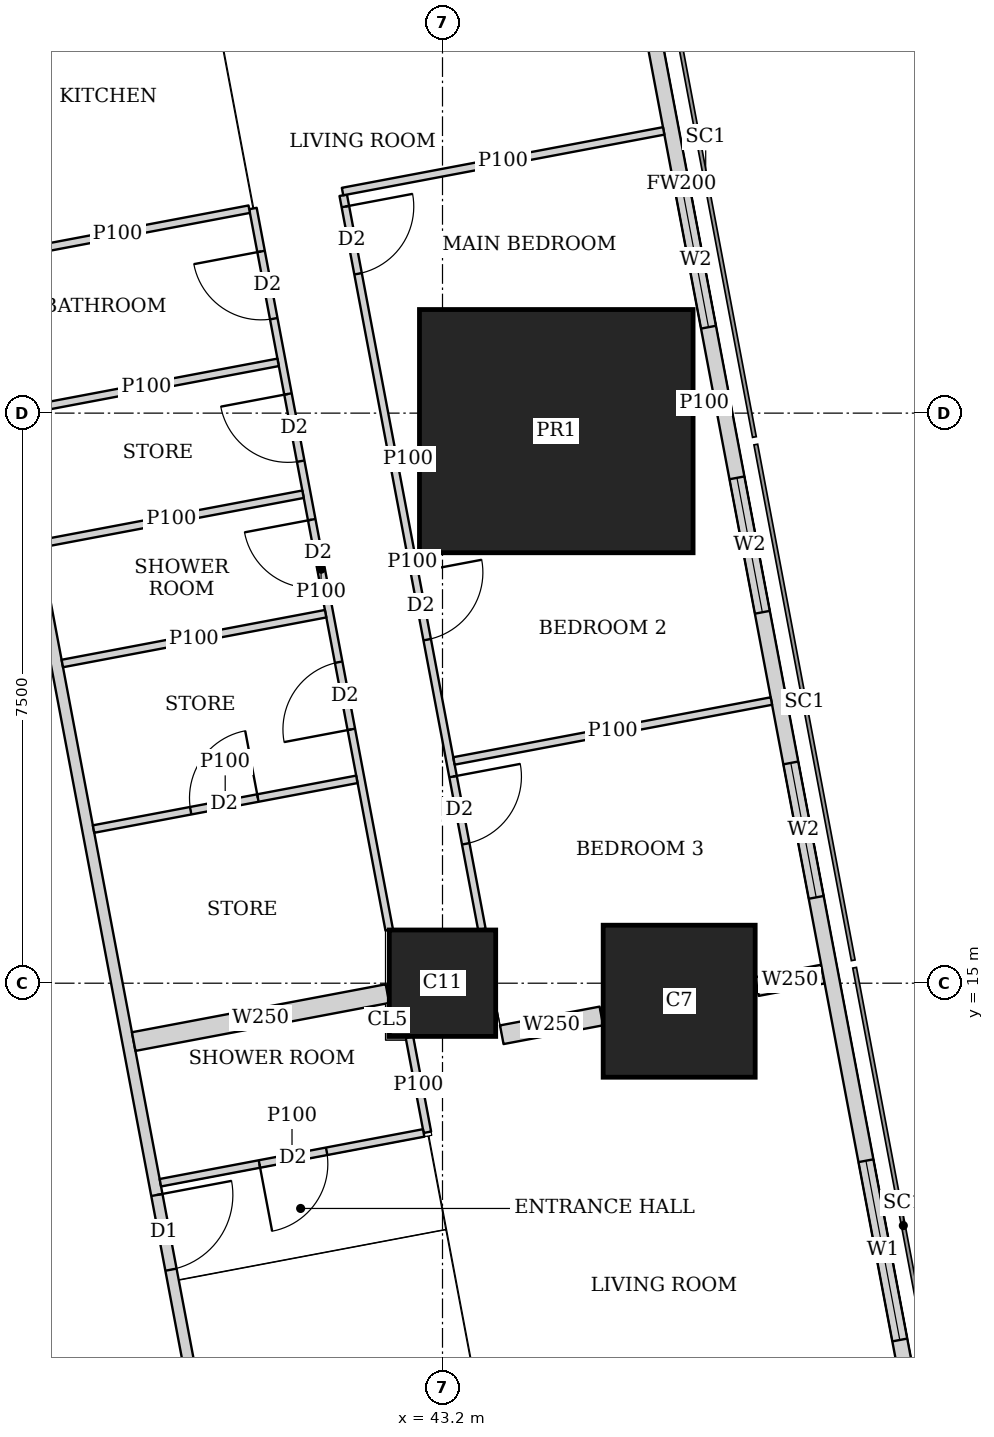
"""IFC4 building model, lengths in metres.
Left out: names, types, materials, properties, quantities, classifications, styles, units other than length and angle.
Written with IfcOpenShell. Run it as: python <this file> out.ifc"""

import sys

from ifc_helpers import new_model, si_unit, direction, frame, frame_2d, origin, origin_2d, place, context, subcontext, project, spatial, rectangle, extrude, element, fill, save


model = new_model("IFC4")
c1 = context("Model", 3, precision=1e-05, world=origin(), true_north=direction((0.0, 1.0)))
c2 = subcontext(c1, "Body", "Model", "MODEL_VIEW")
j1 = project(units=[si_unit("LENGTHUNIT", "METRE"), si_unit("PLANEANGLEUNIT", "RADIAN")], contexts=[c1])
p1 = place(None, origin())
s1 = spatial("IfcSite", under=j1, at=p1, CompositionType="ELEMENT")
p2 = place(p1, origin())
s2 = spatial("IfcBuilding", under=s1, at=p2, CompositionType="ELEMENT")
p3 = place(p2, frame((0.0, 0.0, 274.1)))
s3 = spatial("IfcBuildingStorey", under=s2, at=p3, CompositionType="ELEMENT", Elevation=274.1)
p4 = place(p3, frame((43.2, 15.0, 0.0), z_axis=(0.0, 0.0, 1.0), x_axis=(1.0, 0.0, 0.0)))
e1 = element("IfcColumn", 1, at=p4, inside=s3, PredefinedType="COLUMN", context=c2, shape_type="SweptSolid", body=[
    extrude(rectangle(XDim=1.4, YDim=1.4, at=origin_2d()), origin(), (0.0, 0.0, 1.0), 3.75),
])
p5 = place(p3, frame((46.314, 14.763, 0.0), z_axis=(0.0, 0.0, 1.0), x_axis=(1.0, 0.0, 0.0)))
e2 = element("IfcColumn", 2, at=p5, inside=s3, PredefinedType="COLUMN", context=c2, shape_type="SweptSolid", body=[
    extrude(rectangle(XDim=2.0, YDim=2.0, at=origin_2d()), origin(), (0.0, 0.0, 1.0), 3.75),
])
p6 = place(p3, frame((44.697, 22.263, 0.0), z_axis=(0.0, 0.0, 1.0), x_axis=(1.0, 0.0, 0.0)))
e3 = element("IfcColumn", 3, at=p6, inside=s3, PredefinedType="COLUMN", context=c2, shape_type="SweptSolid", body=[
    extrude(rectangle(XDim=3.6, YDim=3.2, at=origin_2d()), origin(), (0.0, 0.0, 1.0), 3.75),
])
p7 = place(p3, frame((49.684, 7.832, 0.0), z_axis=(0.0, 0.0, 1.0), x_axis=(-0.185616669694, 0.982622232565, 0.0)))
e4 = element("IfcWall", 4, at=p7, inside=s3, PredefinedType="SOLIDWALL", context=c2, shape_type="SweptSolid", body=[
    extrude(rectangle(XDim=36.0, YDim=0.2, at=frame_2d((18.0, 0.0))), origin(), (0.0, 0.0, 1.0), 3.5),
])
p8 = place(p7, frame((2.518, 0.0, 0.9)))
e5 = element("IfcOpeningElement", 5, at=p8, cuts=e4, PredefinedType="OPENING", context=c2, shape_type="SweptSolid", body=[
    extrude(rectangle(XDim=2.4, YDim=1.5, at=frame_2d((1.2, 0.75))), frame((0.0, 0.11, 0.0), z_axis=(0.0, -1.0, 0.0), x_axis=(1.0, 0.0, 0.0)), (0.0, 0.0, 1.0), 0.22),
])
p9 = place(p7, frame((8.444, 0.0, 0.9)))
e6 = element("IfcOpeningElement", 6, at=p9, cuts=e4, PredefinedType="OPENING", context=c2, shape_type="SweptSolid", body=[
    extrude(rectangle(XDim=1.8, YDim=1.5, at=frame_2d((0.9, 0.75))), frame((0.0, 0.11, 0.0), z_axis=(0.0, -1.0, 0.0), x_axis=(1.0, 0.0, 0.0)), (0.0, 0.0, 1.0), 0.22),
])
p10 = place(p7, frame((12.261, 0.0, 0.9)))
e7 = element("IfcOpeningElement", 7, at=p10, cuts=e4, PredefinedType="OPENING", context=c2, shape_type="SweptSolid", body=[
    extrude(rectangle(XDim=1.8, YDim=1.5, at=frame_2d((0.9, 0.75))), frame((0.0, 0.11, 0.0), z_axis=(0.0, -1.0, 0.0), x_axis=(1.0, 0.0, 0.0)), (0.0, 0.0, 1.0), 0.22),
])
p11 = place(p7, frame((16.078, 0.0, 0.9)))
e8 = element("IfcOpeningElement", 8, at=p11, cuts=e4, PredefinedType="OPENING", context=c2, shape_type="SweptSolid", body=[
    extrude(rectangle(XDim=1.8, YDim=1.5, at=frame_2d((0.9, 0.75))), frame((0.0, 0.11, 0.0), z_axis=(0.0, -1.0, 0.0), x_axis=(1.0, 0.0, 0.0)), (0.0, 0.0, 1.0), 0.22),
])
p12 = place(p7, frame((19.894, 0.0, 0.9)))
e9 = element("IfcOpeningElement", 9, at=p12, cuts=e4, PredefinedType="OPENING", context=c2, shape_type="SweptSolid", body=[
    extrude(rectangle(XDim=1.8, YDim=1.5, at=frame_2d((0.9, 0.75))), frame((0.0, 0.11, 0.0), z_axis=(0.0, -1.0, 0.0), x_axis=(1.0, 0.0, 0.0)), (0.0, 0.0, 1.0), 0.22),
])
p13 = place(p7, frame((23.71, 0.0, 0.9)))
e10 = element("IfcOpeningElement", 10, at=p13, cuts=e4, PredefinedType="OPENING", context=c2, shape_type="SweptSolid", body=[
    extrude(rectangle(XDim=1.8, YDim=1.5, at=frame_2d((0.9, 0.75))), frame((0.0, 0.11, 0.0), z_axis=(0.0, -1.0, 0.0), x_axis=(1.0, 0.0, 0.0)), (0.0, 0.0, 1.0), 0.22),
])
p14 = place(p7, frame((27.526, 0.0, 0.9)))
e11 = element("IfcOpeningElement", 11, at=p14, cuts=e4, PredefinedType="OPENING", context=c2, shape_type="SweptSolid", body=[
    extrude(rectangle(XDim=1.8, YDim=1.5, at=frame_2d((0.9, 0.75))), frame((0.0, 0.11, 0.0), z_axis=(0.0, -1.0, 0.0), x_axis=(1.0, 0.0, 0.0)), (0.0, 0.0, 1.0), 0.22),
])
p15 = place(p7, frame((32.046, 0.0, 0.9)))
e12 = element("IfcOpeningElement", 12, at=p15, cuts=e4, PredefinedType="OPENING", context=c2, shape_type="SweptSolid", body=[
    extrude(rectangle(XDim=1.8, YDim=1.5, at=frame_2d((0.9, 0.75))), frame((0.0, 0.11, 0.0), z_axis=(0.0, -1.0, 0.0), x_axis=(1.0, 0.0, 0.0)), (0.0, 0.0, 1.0), 0.22),
])
p16 = place(p3, frame((33.781, 42.186, 0.0), z_axis=(0.0, 0.0, 1.0), x_axis=(0.185593518645, -0.9826266055, 0.0)))
e13 = element("IfcWall", 13, at=p16, inside=s3, PredefinedType="SOLIDWALL", context=c2, shape_type="SweptSolid", body=[
    extrude(rectangle(XDim=35.961, YDim=0.15, at=frame_2d((17.98, 0.0))), origin(), (0.0, 0.0, 1.0), 2.5),
])
p17 = place(p16, frame((11.76, 0.0, 0.0)))
e14 = element("IfcOpeningElement", 14, at=p17, cuts=e13, PredefinedType="OPENING", context=c2, shape_type="SweptSolid", body=[
    extrude(rectangle(XDim=1.0, YDim=2.1, at=frame_2d((0.5, 1.05))), frame((0.0, 0.085, 0.0), z_axis=(0.0, -1.0, 0.0), x_axis=(1.0, 0.0, 0.0)), (0.0, 0.0, 1.0), 0.17),
])
p18 = place(p16, frame((15.576, 0.0, 0.0)))
e15 = element("IfcOpeningElement", 15, at=p18, cuts=e13, PredefinedType="OPENING", context=c2, shape_type="SweptSolid", body=[
    extrude(rectangle(XDim=1.0, YDim=2.1, at=frame_2d((0.5, 1.05))), frame((0.0, 0.085, 0.0), z_axis=(0.0, -1.0, 0.0), x_axis=(1.0, 0.0, 0.0)), (0.0, 0.0, 1.0), 0.17),
])
p19 = place(p16, frame((30.502, 0.0, 0.0)))
e16 = element("IfcOpeningElement", 16, at=p19, cuts=e13, PredefinedType="OPENING", context=c2, shape_type="SweptSolid", body=[
    extrude(rectangle(XDim=1.0, YDim=2.1, at=frame_2d((0.5, 1.05))), frame((0.0, 0.085, 0.0), z_axis=(0.0, -1.0, 0.0), x_axis=(1.0, 0.0, 0.0)), (0.0, 0.0, 1.0), 0.17),
])
p20 = place(p3, frame((41.894, 25.366, 0.0), z_axis=(0.0, 0.0, 1.0), x_axis=(0.185612905165, -0.982622943675, 0.0)))
e17 = element("IfcWall", 17, at=p20, inside=s3, PredefinedType="PARTITIONING", context=c2, shape_type="SweptSolid", body=[
    extrude(rectangle(XDim=9.827, YDim=0.1, at=frame_2d((4.913, 0.0))), origin(), (0.0, 0.0, 1.0), 2.5),
])
p21 = place(p20, frame((0.151, 0.0, 0.0)))
e18 = element("IfcOpeningElement", 18, at=p21, cuts=e17, PredefinedType="OPENING", context=c2, shape_type="SweptSolid", body=[
    extrude(rectangle(XDim=0.9, YDim=2.1, at=frame_2d((0.45, 1.05))), frame((0.0, 0.06, 0.0), z_axis=(0.0, -1.0, 0.0), x_axis=(1.0, 0.0, 0.0)), (0.0, 0.0, 1.0), 0.12),
])
p22 = place(p20, frame((5.05, 0.0, 0.0)))
e19 = element("IfcOpeningElement", 19, at=p22, cuts=e17, PredefinedType="OPENING", context=c2, shape_type="SweptSolid", body=[
    extrude(rectangle(XDim=0.9, YDim=2.1, at=frame_2d((0.45, 1.05))), frame((0.0, 0.06, 0.0), z_axis=(0.0, -1.0, 0.0), x_axis=(1.0, 0.0, 0.0)), (0.0, 0.0, 1.0), 0.12),
])
p23 = place(p20, frame((7.783, 0.0, 0.0)))
e20 = element("IfcOpeningElement", 20, at=p23, cuts=e17, PredefinedType="OPENING", context=c2, shape_type="SweptSolid", body=[
    extrude(rectangle(XDim=0.9, YDim=2.1, at=frame_2d((0.45, 1.05))), frame((0.0, 0.06, 0.0), z_axis=(0.0, -1.0, 0.0), x_axis=(1.0, 0.0, 0.0)), (0.0, 0.0, 1.0), 0.12),
])
p24 = place(p3, frame((40.706, 25.192, 0.0), z_axis=(0.0, 0.0, 1.0), x_axis=(0.185629824463, -0.982619747547, 0.0)))
e21 = element("IfcWall", 21, at=p24, inside=s3, PredefinedType="PARTITIONING", context=c2, shape_type="SweptSolid", body=[
    extrude(rectangle(XDim=9.659, YDim=0.1, at=frame_2d((4.83, 0.0))), origin(), (0.0, 0.0, 1.0), 2.5),
])
p25 = place(p24, frame((0.575, 0.0, 0.0)))
e22 = element("IfcOpeningElement", 22, at=p25, cuts=e21, PredefinedType="OPENING", context=c2, shape_type="SweptSolid", body=[
    extrude(rectangle(XDim=0.9, YDim=2.1, at=frame_2d((0.45, 1.05))), frame((0.0, 0.06, 0.0), z_axis=(0.0, -1.0, 0.0), x_axis=(1.0, 0.0, 0.0)), (0.0, 0.0, 1.0), 0.12),
])
p26 = place(p24, frame((4.166, 0.0, 0.0)))
e23 = element("IfcOpeningElement", 23, at=p26, cuts=e21, PredefinedType="OPENING", context=c2, shape_type="SweptSolid", body=[
    extrude(rectangle(XDim=0.9, YDim=2.1, at=frame_2d((0.45, 1.05))), frame((0.0, 0.06, 0.0), z_axis=(0.0, -1.0, 0.0), x_axis=(1.0, 0.0, 0.0)), (0.0, 0.0, 1.0), 0.12),
])
p27 = place(p24, frame((2.483, 0.0, 0.0)))
e24 = element("IfcOpeningElement", 24, at=p27, cuts=e21, PredefinedType="OPENING", context=c2, shape_type="SweptSolid", body=[
    extrude(rectangle(XDim=0.9, YDim=2.1, at=frame_2d((0.45, 1.05))), frame((0.0, 0.06, 0.0), z_axis=(0.0, -1.0, 0.0), x_axis=(1.0, 0.0, 0.0)), (0.0, 0.0, 1.0), 0.12),
])
p28 = place(p24, frame((6.074, 0.0, 0.0)))
e25 = element("IfcOpeningElement", 25, at=p28, cuts=e21, PredefinedType="OPENING", context=c2, shape_type="SweptSolid", body=[
    extrude(rectangle(XDim=0.9, YDim=2.1, at=frame_2d((0.45, 1.05))), frame((0.0, 0.06, 0.0), z_axis=(0.0, -1.0, 0.0), x_axis=(1.0, 0.0, 0.0)), (0.0, 0.0, 1.0), 0.12),
])
p29 = place(p3, frame((46.11, 26.213, 0.0), z_axis=(0.0, 0.0, 1.0), x_axis=(-0.982633535512, -0.185556823879, 0.0)))
e26 = element("IfcWall", 26, at=p29, inside=s3, PredefinedType="PARTITIONING", context=c2, shape_type="SweptSolid", body=[
    extrude(rectangle(XDim=4.3, YDim=0.1, at=frame_2d((2.15, 0.0))), origin(), (0.0, 0.0, 1.0), 2.5),
])
p30 = place(p3, frame((46.782, 22.657, 0.0), z_axis=(0.0, 0.0, 1.0), x_axis=(-0.982574553168, -0.185868898601, 0.0)))
e27 = element("IfcWall", 27, at=p30, inside=s3, PredefinedType="PARTITIONING", context=c2, shape_type="SweptSolid", body=[
    extrude(rectangle(XDim=0.28, YDim=0.1, at=frame_2d((0.14, 0.0))), origin(), (0.0, 0.0, 1.0), 3.5),
])
p31 = place(p3, frame((42.887, 21.921, 0.0), z_axis=(0.0, 0.0, 1.0), x_axis=(-0.982688058078, -0.185267861514, 0.0)))
e28 = element("IfcWall", 28, at=p31, inside=s3, PredefinedType="PARTITIONING", context=c2, shape_type="SweptSolid", body=[
    extrude(rectangle(XDim=0.286, YDim=0.1, at=frame_2d((0.143, 0.0))), origin(), (0.0, 0.0, 1.0), 2.5),
])
p32 = place(p3, frame((47.527, 18.712, 0.0), z_axis=(0.0, 0.0, 1.0), x_axis=(-0.982665405803, -0.185387972203, 0.0)))
e29 = element("IfcWall", 29, at=p32, inside=s3, PredefinedType="PARTITIONING", context=c2, shape_type="SweptSolid", body=[
    extrude(rectangle(XDim=4.25, YDim=0.1, at=frame_2d((2.125, 0.0))), origin(), (0.0, 0.0, 1.0), 2.5),
])
p33 = place(p3, frame((40.657, 25.183, 0.0), z_axis=(0.0, 0.0, 1.0), x_axis=(-0.982585626838, -0.185810349366, 0.0)))
e30 = element("IfcWall", 30, at=p33, inside=s3, PredefinedType="PARTITIONING", context=c2, shape_type="SweptSolid", body=[
    extrude(rectangle(XDim=3.525, YDim=0.1, at=frame_2d((1.763, 0.0))), origin(), (0.0, 0.0, 1.0), 3.5),
])
p34 = place(p3, frame((41.365, 21.433, 0.0), z_axis=(0.0, 0.0, 1.0), x_axis=(-0.982638553676, -0.185530247748, 0.0)))
e31 = element("IfcWall", 31, at=p34, inside=s3, PredefinedType="PARTITIONING", context=c2, shape_type="SweptSolid", body=[
    extrude(rectangle(XDim=3.525, YDim=0.1, at=frame_2d((1.763, 0.0))), origin(), (0.0, 0.0, 1.0), 3.5),
])
p35 = place(p3, frame((42.073, 17.682, 0.0), z_axis=(0.0, 0.0, 1.0), x_axis=(-0.98265117712, -0.185463376723, 0.0)))
e32 = element("IfcWall", 32, at=p35, inside=s3, PredefinedType="PARTITIONING", context=c2, shape_type="SweptSolid", body=[
    extrude(rectangle(XDim=3.525, YDim=0.1, at=frame_2d((1.763, 0.0))), origin(), (0.0, 0.0, 1.0), 3.5),
])
p36 = place(p35, frame((1.325, 0.0, 0.0)))
e33 = element("IfcOpeningElement", 33, at=p36, cuts=e32, PredefinedType="OPENING", context=c2, shape_type="SweptSolid", body=[
    extrude(rectangle(XDim=0.9, YDim=2.1, at=frame_2d((0.45, 1.05))), frame((0.0, 0.06, 0.0), z_axis=(0.0, -1.0, 0.0), x_axis=(1.0, 0.0, 0.0)), (0.0, 0.0, 1.0), 0.12),
])
p37 = place(p3, frame((41.037, 23.168, 0.0), z_axis=(0.0, 0.0, 1.0), x_axis=(-0.982638553676, -0.185530247748, 0.0)))
e34 = element("IfcWall", 34, at=p37, inside=s3, PredefinedType="PARTITIONING", context=c2, shape_type="SweptSolid", body=[
    extrude(rectangle(XDim=3.525, YDim=0.1, at=frame_2d((1.763, 0.0))), origin(), (0.0, 0.0, 1.0), 2.5),
])
p38 = place(p3, frame((41.662, 19.861, 0.0), z_axis=(0.0, 0.0, 1.0), x_axis=(-0.982588017646, -0.185797706064, 0.0)))
e35 = element("IfcWall", 35, at=p38, inside=s3, PredefinedType="PARTITIONING", context=c2, shape_type="SweptSolid", body=[
    extrude(rectangle(XDim=3.525, YDim=0.1, at=frame_2d((1.763, 0.0))), origin(), (0.0, 0.0, 1.0), 3.5),
])
p39 = place(p3, frame((42.765, 14.29, 0.0), z_axis=(0.0, 0.0, 1.0), x_axis=(0.185446293138, -0.982654401283, 0.0)))
e36 = element("IfcWall", 36, at=p39, inside=s3, PredefinedType="PARTITIONING", context=c2, shape_type="SweptSolid", body=[
    extrude(rectangle(XDim=1.273, YDim=0.1, at=frame_2d((0.636, 0.0))), origin(), (0.0, 0.0, 1.0), 3.5),
])
p40 = place(p3, frame((42.952, 13.03, 0.0), z_axis=(0.0, 0.0, 1.0), x_axis=(-0.982585626838, -0.185810349366, 0.0)))
e37 = element("IfcWall", 37, at=p40, inside=s3, PredefinedType="PARTITIONING", context=c2, shape_type="SweptSolid", body=[
    extrude(rectangle(XDim=3.525, YDim=0.1, at=frame_2d((1.763, 0.0))), origin(), (0.0, 0.0, 1.0), 3.5),
])
p41 = place(p40, frame((1.299, 0.0, 0.0)))
e38 = element("IfcOpeningElement", 38, at=p41, cuts=e37, PredefinedType="OPENING", context=c2, shape_type="SweptSolid", body=[
    extrude(rectangle(XDim=0.9, YDim=2.1, at=frame_2d((0.45, 1.05))), frame((0.0, 0.06, 0.0), z_axis=(0.0, -1.0, 0.0), x_axis=(1.0, 0.0, 0.0)), (0.0, 0.0, 1.0), 0.12),
])
p42 = place(p3, frame((48.206, 15.12, 0.0), z_axis=(0.0, 0.0, 1.0), x_axis=(-0.982608419258, -0.185689780017, 0.0)))
e39 = element("IfcWall", 39, at=p42, inside=s3, PredefinedType="SOLIDWALL", context=c2, shape_type="SweptSolid", body=[
    extrude(rectangle(XDim=0.884, YDim=0.25, at=frame_2d((0.442, 0.0))), origin(), (0.0, 0.0, 1.0), 3.5),
])
p43 = place(p3, frame((45.29, 14.569, 0.0), z_axis=(0.0, 0.0, 1.0), x_axis=(-0.982676759201, -0.185327782391, 0.0)))
e40 = element("IfcWall", 40, at=p43, inside=s3, PredefinedType="SOLIDWALL", context=c2, shape_type="SweptSolid", body=[
    extrude(rectangle(XDim=1.333, YDim=0.25, at=frame_2d((0.667, 0.0))), origin(), (0.0, 0.0, 1.0), 3.5),
])
p44 = place(p3, frame((42.476, 14.863, 0.0), z_axis=(0.0, 0.0, 1.0), x_axis=(-0.982603567712, -0.185715450942, 0.0)))
e41 = element("IfcWall", 41, at=p44, inside=s3, PredefinedType="SOLIDWALL", context=c2, shape_type="SweptSolid", body=[
    extrude(rectangle(XDim=3.398, YDim=0.25, at=frame_2d((1.699, 0.0))), origin(), (0.0, 0.0, 1.0), 3.5),
])
p45 = place(p8, origin())
e42 = element("IfcWindow", 42, at=p45, inside=s3, PartitioningType="SINGLE_PANEL", PredefinedType="WINDOW", context=c2, shape_type="SweptSolid", body=[
    extrude(rectangle(XDim=2.4, YDim=1.5, at=frame_2d((1.2, 0.75))), frame((0.0, 0.03, 0.0), z_axis=(0.0, -1.0, 0.0), x_axis=(1.0, 0.0, 0.0)), (0.0, 0.0, 1.0), 0.06),
])
fill(e5, e42)
p46 = place(p9, origin())
e43 = element("IfcWindow", 43, at=p46, inside=s3, PartitioningType="SINGLE_PANEL", PredefinedType="WINDOW", context=c2, shape_type="SweptSolid", body=[
    extrude(rectangle(XDim=1.8, YDim=1.5, at=frame_2d((0.9, 0.75))), frame((0.0, 0.03, 0.0), z_axis=(0.0, -1.0, 0.0), x_axis=(1.0, 0.0, 0.0)), (0.0, 0.0, 1.0), 0.06),
])
fill(e6, e43)
p47 = place(p10, origin())
e44 = element("IfcWindow", 44, at=p47, inside=s3, PartitioningType="SINGLE_PANEL", PredefinedType="WINDOW", context=c2, shape_type="SweptSolid", body=[
    extrude(rectangle(XDim=1.8, YDim=1.5, at=frame_2d((0.9, 0.75))), frame((0.0, 0.03, 0.0), z_axis=(0.0, -1.0, 0.0), x_axis=(1.0, 0.0, 0.0)), (0.0, 0.0, 1.0), 0.06),
])
fill(e7, e44)
p48 = place(p11, origin())
e45 = element("IfcWindow", 45, at=p48, inside=s3, PartitioningType="SINGLE_PANEL", PredefinedType="WINDOW", context=c2, shape_type="SweptSolid", body=[
    extrude(rectangle(XDim=1.8, YDim=1.5, at=frame_2d((0.9, 0.75))), frame((0.0, 0.03, 0.0), z_axis=(0.0, -1.0, 0.0), x_axis=(1.0, 0.0, 0.0)), (0.0, 0.0, 1.0), 0.06),
])
fill(e8, e45)
p49 = place(p21, origin())
e46 = element("IfcDoor", 46, at=p49, inside=s3, OperationType="SINGLE_SWING_LEFT", PredefinedType="DOOR", context=c2, shape_type="SweptSolid", body=[
    extrude(rectangle(XDim=0.9, YDim=2.1, at=frame_2d((0.45, 1.05))), frame((0.0, 0.025, 0.0), z_axis=(0.0, -1.0, 0.0), x_axis=(1.0, 0.0, 0.0)), (0.0, 0.0, 1.0), 0.05),
])
fill(e18, e46)
p50 = place(p22, origin())
e47 = element("IfcDoor", 47, at=p50, inside=s3, OperationType="SINGLE_SWING_LEFT", PredefinedType="DOOR", context=c2, shape_type="SweptSolid", body=[
    extrude(rectangle(XDim=0.9, YDim=2.1, at=frame_2d((0.45, 1.05))), frame((0.0, 0.025, 0.0), z_axis=(0.0, -1.0, 0.0), x_axis=(1.0, 0.0, 0.0)), (0.0, 0.0, 1.0), 0.05),
])
fill(e19, e47)
p51 = place(p23, origin())
e48 = element("IfcDoor", 48, at=p51, inside=s3, OperationType="SINGLE_SWING_LEFT", PredefinedType="DOOR", context=c2, shape_type="SweptSolid", body=[
    extrude(rectangle(XDim=0.9, YDim=2.1, at=frame_2d((0.45, 1.05))), frame((0.0, 0.025, 0.0), z_axis=(0.0, -1.0, 0.0), x_axis=(1.0, 0.0, 0.0)), (0.0, 0.0, 1.0), 0.05),
])
fill(e20, e48)
p52 = place(p25, origin())
e49 = element("IfcDoor", 49, at=p52, inside=s3, OperationType="SINGLE_SWING_RIGHT", PredefinedType="DOOR", context=c2, shape_type="SweptSolid", body=[
    extrude(rectangle(XDim=0.9, YDim=2.1, at=frame_2d((0.45, 1.05))), frame((0.0, 0.025, 0.0), z_axis=(0.0, -1.0, 0.0), x_axis=(1.0, 0.0, 0.0)), (0.0, 0.0, 1.0), 0.05),
])
fill(e22, e49)
p53 = place(p26, origin())
e50 = element("IfcDoor", 50, at=p53, inside=s3, OperationType="SINGLE_SWING_RIGHT", PredefinedType="DOOR", context=c2, shape_type="SweptSolid", body=[
    extrude(rectangle(XDim=0.9, YDim=2.1, at=frame_2d((0.45, 1.05))), frame((0.0, 0.025, 0.0), z_axis=(0.0, -1.0, 0.0), x_axis=(1.0, 0.0, 0.0)), (0.0, 0.0, 1.0), 0.05),
])
fill(e23, e50)
p54 = place(p27, origin())
e51 = element("IfcDoor", 51, at=p54, inside=s3, OperationType="SINGLE_SWING_RIGHT", PredefinedType="DOOR", context=c2, shape_type="SweptSolid", body=[
    extrude(rectangle(XDim=0.9, YDim=2.1, at=frame_2d((0.45, 1.05))), frame((0.0, 0.025, 0.0), z_axis=(0.0, -1.0, 0.0), x_axis=(1.0, 0.0, 0.0)), (0.0, 0.0, 1.0), 0.05),
])
fill(e24, e51)
p55 = place(p28, origin())
e52 = element("IfcDoor", 52, at=p55, inside=s3, OperationType="SINGLE_SWING_LEFT", PredefinedType="DOOR", context=c2, shape_type="SweptSolid", body=[
    extrude(rectangle(XDim=0.9, YDim=2.1, at=frame_2d((0.45, 1.05))), frame((0.0, 0.025, 0.0), z_axis=(0.0, -1.0, 0.0), x_axis=(1.0, 0.0, 0.0)), (0.0, 0.0, 1.0), 0.05),
])
fill(e25, e52)
p56 = place(p41, origin())
e53 = element("IfcDoor", 53, at=p56, inside=s3, OperationType="SINGLE_SWING_RIGHT", PredefinedType="DOOR", context=c2, shape_type="SweptSolid", body=[
    extrude(rectangle(XDim=0.9, YDim=2.1, at=frame_2d((0.45, 1.05))), frame((0.0, 0.025, 0.0), z_axis=(0.0, -1.0, 0.0), x_axis=(1.0, 0.0, 0.0)), (0.0, 0.0, 1.0), 0.05),
])
fill(e38, e53)
p57 = place(p19, origin())
e54 = element("IfcDoor", 54, at=p57, inside=s3, OperationType="SINGLE_SWING_LEFT", PredefinedType="DOOR", context=c2, shape_type="SweptSolid", body=[
    extrude(rectangle(XDim=1.0, YDim=2.1, at=frame_2d((0.5, 1.05))), frame((0.0, 0.025, 0.0), z_axis=(0.0, -1.0, 0.0), x_axis=(1.0, 0.0, 0.0)), (0.0, 0.0, 1.0), 0.05),
])
fill(e16, e54)
p58 = place(p36, origin())
e55 = element("IfcDoor", 55, at=p58, inside=s3, OperationType="SINGLE_SWING_RIGHT", PredefinedType="DOOR", context=c2, shape_type="SweptSolid", body=[
    extrude(rectangle(XDim=0.9, YDim=2.1, at=frame_2d((0.45, 1.05))), frame((0.0, 0.025, 0.0), z_axis=(0.0, -1.0, 0.0), x_axis=(1.0, 0.0, 0.0)), (0.0, 0.0, 1.0), 0.05),
])
fill(e33, e55)
save(model, sys.argv[1])
